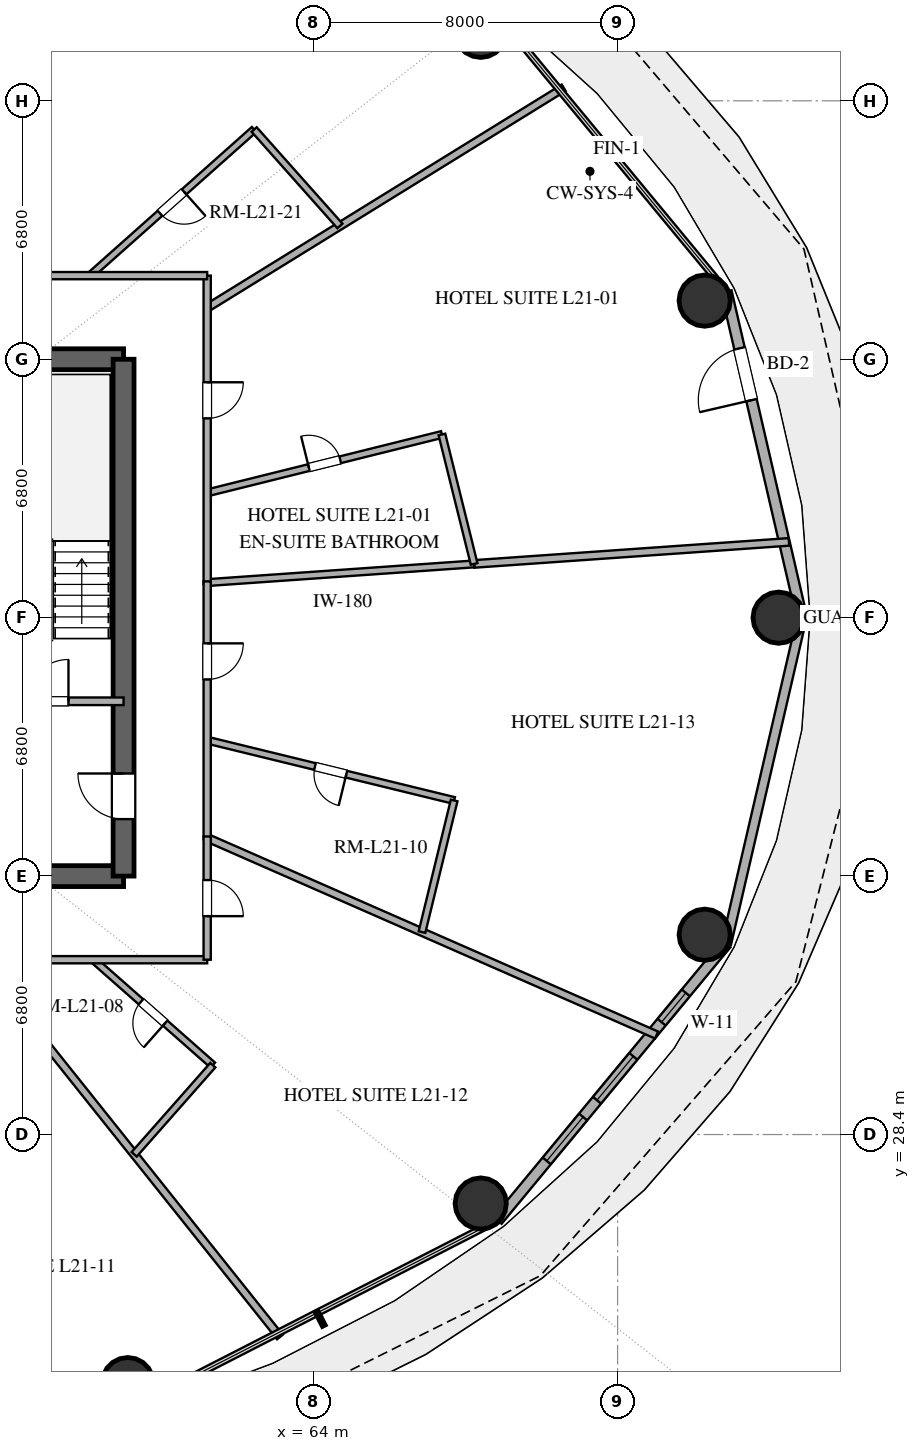
"""IFC4 building model, lengths in metres.
Left out: names, types, materials, properties, quantities, classifications, styles, units other than length and angle.
Written with IfcOpenShell. Run it as: python <this file> out.ifc"""

import sys

from ifc_helpers import new_model, si_unit, direction, frame, frame_2d, origin, origin_2d, place, context, subcontext, project, spatial, rectangle, hollow_circle, extrude, element, fill, save


model = new_model("IFC4")
c1 = context("Model", 3, precision=1e-05, world=origin(), true_north=direction((0.0, 1.0)))
c2 = subcontext(c1, "Body", "Model", "MODEL_VIEW")
j1 = project(units=[si_unit("LENGTHUNIT", "METRE"), si_unit("PLANEANGLEUNIT", "RADIAN")], contexts=[c1])
p1 = place(None, origin())
s1 = spatial("IfcSite", under=j1, at=p1, CompositionType="ELEMENT")
p2 = place(p1, origin())
s2 = spatial("IfcBuilding", under=s1, at=p2, CompositionType="ELEMENT")
p3 = place(p2, frame((0.0, 0.0, 87.6)))
s3 = spatial("IfcBuildingStorey", under=s2, at=p3, CompositionType="ELEMENT", Elevation=87.6)
for number, where, z_axis, x_axis in (
    (1, (55.0, 35.2, 0.0), (0.0, 0.0, 1.0), (1.0, 0.0, 0.0)),
    (2, (55.0, 48.8, 0.0), (0.0, 0.0, 1.0), (1.0, 0.0, 0.0)),
):
    element("IfcWall", number, at=place(p3, frame(where, z_axis=z_axis, x_axis=x_axis)), inside=s3, PredefinedType="SHEAR", context=c2, shape_type="SweptSolid", body=[
        extrude(rectangle(XDim=4.0, YDim=0.55, at=frame_2d((2.0, 0.0))), origin(), (0.0, 0.0, 1.0), 3.38),
    ])
p4 = place(p3, frame((59.0, 35.2, 0.0), z_axis=(0.0, 0.0, 1.0), x_axis=(0.0, 1.0, 0.0)))
e3 = element("IfcWall", 3, at=p4, inside=s3, PredefinedType="SHEAR", context=c2, shape_type="SweptSolid", body=[
    extrude(rectangle(XDim=13.6, YDim=0.55, at=frame_2d((6.8, 0.0))), origin(), (0.0, 0.0, 1.0), 3.38),
])
p5 = place(p4, frame((1.5, 0.0, 0.0)))
e4 = element("IfcOpeningElement", 4, at=p5, cuts=e3, PredefinedType="OPENING", context=c2, shape_type="SweptSolid", body=[
    extrude(rectangle(XDim=1.2, YDim=2.15, at=frame_2d((0.6, 1.075))), frame((0.0, 0.285, 0.0), z_axis=(0.0, -1.0, 0.0), x_axis=(1.0, 0.0, 0.0)), (0.0, 0.0, 1.0), 0.57),
])
for number, where, z_axis, x_axis in (
    (5, (76.237, 42.0, 0.0), (0.0, 0.0, 1.0), (1.0, 0.0, 0.0)),
    (6, (74.291, 50.343, 0.0), (0.0, 0.0, 1.0), (1.0, 0.0, 0.0)),
    (7, (68.398, 57.415, 0.0), (0.0, 0.0, 1.0), (1.0, 0.0, 0.0)),
    (8, (59.11, 21.859, 0.0), (0.0, 0.0, 1.0), (1.0, 0.0, 0.0)),
    (9, (68.398, 26.585, 0.0), (0.0, 0.0, 1.0), (1.0, 0.0, 0.0)),
    (10, (74.291, 33.657, 0.0), (0.0, 0.0, 1.0), (1.0, 0.0, 0.0)),
):
    element("IfcColumn", number, at=place(p3, frame(where, z_axis=z_axis, x_axis=x_axis)), inside=s3, PredefinedType="COLUMN", context=c2, shape_type="SweptSolid", body=[
        extrude(hollow_circle(Radius=0.675, WallThickness=0.036, at=origin_2d()), origin(), (0.0, 0.0, 1.0), 3.38),
    ])
p6 = place(p3, frame((76.849, 42.0, 0.0), z_axis=(0.0, 0.0, 1.0), x_axis=(-0.22558597182, 0.974223264616, 0.0)))
e11 = element("IfcWall", 11, at=p6, inside=s3, PredefinedType="SOLIDWALL", context=c2, shape_type="SweptSolid", body=[
    extrude(rectangle(XDim=8.811, YDim=0.28, at=frame_2d((4.405, 0.0))), origin(), (0.0, 0.0, 1.0), 3.38),
])
p7 = place(p6, frame((5.875, 0.0, 0.0)))
e12 = element("IfcOpeningElement", 12, at=p7, cuts=e11, PredefinedType="OPENING", context=c2, shape_type="SweptSolid", body=[
    extrude(rectangle(XDim=1.4, YDim=2.2, at=frame_2d((0.7, 1.1))), frame((0.0, 0.15, 0.0), z_axis=(0.0, -1.0, 0.0), x_axis=(1.0, 0.0, 0.0)), (0.0, 0.0, 1.0), 0.3),
])
p8 = place(p3, frame((68.84, 26.14, 0.0), z_axis=(0.0, 0.0, 1.0), x_axis=(0.637505817448, 0.770445541696, 0.0)))
e13 = element("IfcWall", 13, at=p8, inside=s3, PredefinedType="SOLIDWALL", context=c2, shape_type="SweptSolid", body=[
    extrude(rectangle(XDim=9.445, YDim=0.28, at=frame_2d((4.723, 0.0))), origin(), (0.0, 0.0, 1.0), 3.38),
])
p9 = place(p8, frame((2.033, 0.0, 0.85)))
e14 = element("IfcOpeningElement", 14, at=p9, cuts=e13, PredefinedType="OPENING", context=c2, shape_type="SweptSolid", body=[
    extrude(rectangle(XDim=1.5, YDim=1.8, at=frame_2d((0.75, 0.9))), frame((0.0, 0.15, 0.0), z_axis=(0.0, -1.0, 0.0), x_axis=(1.0, 0.0, 0.0)), (0.0, 0.0, 1.0), 0.3),
])
p10 = place(p8, frame((4.105, 0.0, 0.85)))
e15 = element("IfcOpeningElement", 15, at=p10, cuts=e13, PredefinedType="OPENING", context=c2, shape_type="SweptSolid", body=[
    extrude(rectangle(XDim=1.5, YDim=1.8, at=frame_2d((0.75, 0.9))), frame((0.0, 0.15, 0.0), z_axis=(0.0, -1.0, 0.0), x_axis=(1.0, 0.0, 0.0)), (0.0, 0.0, 1.0), 0.3),
])
p11 = place(p8, frame((6.772, 0.0, 0.85)))
e16 = element("IfcOpeningElement", 16, at=p11, cuts=e13, PredefinedType="OPENING", context=c2, shape_type="SweptSolid", body=[
    extrude(rectangle(XDim=1.0, YDim=1.8, at=frame_2d((0.5, 0.9))), frame((0.0, 0.15, 0.0), z_axis=(0.0, -1.0, 0.0), x_axis=(1.0, 0.0, 0.0)), (0.0, 0.0, 1.0), 0.3),
])
p12 = place(p3, frame((74.861, 33.417, 0.0), z_axis=(0.0, 0.0, 1.0), x_axis=(0.22558597182, 0.974223264616, 0.0)))
e17 = element("IfcWall", 17, at=p12, inside=s3, PredefinedType="SOLIDWALL", context=c2, shape_type="SweptSolid", body=[
    extrude(rectangle(XDim=8.811, YDim=0.25, at=frame_2d((4.405, 0.0))), origin(), (0.0, 0.0, 1.0), 3.38),
])
p13 = place(p3, frame((55.0, 39.8, 0.0), z_axis=(0.0, 0.0, 1.0), x_axis=(1.0, 0.0, 0.0)))
e18 = element("IfcWall", 18, at=p13, inside=s3, PredefinedType="SOLIDWALL", context=c2, shape_type="SweptSolid", body=[
    extrude(rectangle(XDim=4.0, YDim=0.2, at=frame_2d((2.0, 0.0))), origin(), (0.0, 0.0, 1.0), 2.74),
])
p14 = place(p13, frame((1.45, 0.0, 0.0)))
e19 = element("IfcOpeningElement", 19, at=p14, cuts=e18, PredefinedType="OPENING", context=c2, shape_type="SweptSolid", body=[
    extrude(rectangle(XDim=1.1, YDim=2.15, at=frame_2d((0.55, 1.075))), frame((0.0, 0.11, 0.0), z_axis=(0.0, -1.0, 0.0), x_axis=(1.0, 0.0, 0.0)), (0.0, 0.0, 1.0), 0.22),
])
p15 = place(p3, frame((76.509, 43.994, 0.0), z_axis=(0.0, 0.0, 1.0), x_axis=(-0.997563838401, -0.069759503404, 0.0)))
e20 = element("IfcWall", 20, at=p15, inside=s3, PredefinedType="PARTITIONING", context=c2, shape_type="SweptSolid", body=[
    extrude(rectangle(XDim=8.305, YDim=0.2, at=frame_2d((4.152, 0.0))), origin(), (0.0, 0.0, 1.0), 2.74),
])
p16 = place(p3, frame((60.112, 62.468, 0.0), z_axis=(0.0, 0.0, 1.0), x_axis=(-0.509263960295, -0.860610375689, 0.0)))
e21 = element("IfcWall", 21, at=p16, inside=s3, PredefinedType="PARTITIONING", context=c2, shape_type="SweptSolid", body=[
    extrude(rectangle(XDim=7.583, YDim=0.2, at=frame_2d((3.792, 0.0))), origin(), (0.0, 0.0, 1.0), 2.74),
])
p17 = place(p3, frame((68.224, 43.414, 0.0), z_axis=(0.0, 0.0, 1.0), x_axis=(-0.997563891584, -0.06975874287, 0.0)))
e22 = element("IfcWall", 22, at=p17, inside=s3, PredefinedType="PLUMBINGWALL", context=c2, shape_type="SweptSolid", body=[
    extrude(rectangle(XDim=7.042, YDim=0.18, at=frame_2d((3.521, 0.0))), origin(), (0.0, 0.0, 1.0), 2.74),
])
p18 = place(p3, frame((61.2, 50.15, 0.0), z_axis=(0.0, 0.0, 1.0), x_axis=(0.850874276333, 0.525369361377, 0.0)))
e23 = element("IfcWall", 23, at=p18, inside=s3, PredefinedType="PARTITIONING", context=c2, shape_type="SweptSolid", body=[
    extrude(rectangle(XDim=11.026, YDim=0.2, at=frame_2d((5.513, 0.0))), origin(), (0.0, 0.0, 1.0), 2.74),
])
p19 = place(p3, frame((61.2, 36.208, 0.0), z_axis=(0.0, 0.0, 1.0), x_axis=(0.915722078144, -0.401812239235, 0.0)))
e24 = element("IfcWall", 24, at=p19, inside=s3, PredefinedType="PARTITIONING", context=c2, shape_type="SweptSolid", body=[
    extrude(rectangle(XDim=12.915, YDim=0.2, at=frame_2d((6.458, 0.0))), origin(), (0.0, 0.0, 1.0), 2.74),
])
p20 = place(p3, frame((67.699, 37.189, 0.0), z_axis=(0.0, 0.0, 1.0), x_axis=(-0.971448370468, 0.237251055878, 0.0)))
e25 = element("IfcWall", 25, at=p20, inside=s3, PredefinedType="PLUMBINGWALL", context=c2, shape_type="SweptSolid", body=[
    extrude(rectangle(XDim=6.69, YDim=0.18, at=frame_2d((3.345, 0.0))), origin(), (0.0, 0.0, 1.0), 2.74),
])
p21 = place(p20, frame((2.92, 0.0, 0.0)))
e26 = element("IfcOpeningElement", 26, at=p21, cuts=e25, PredefinedType="OPENING", context=c2, shape_type="SweptSolid", body=[
    extrude(rectangle(XDim=0.85, YDim=2.1, at=frame_2d((0.425, 1.05))), frame((0.0, 0.1, 0.0), z_axis=(0.0, -1.0, 0.0), x_axis=(1.0, 0.0, 0.0)), (0.0, 0.0, 1.0), 0.2),
])
p22 = place(p3, frame((55.189, 33.0, 0.0), z_axis=(0.0, 0.0, 1.0), x_axis=(0.624085468444, -0.781356082767, 0.0)))
e27 = element("IfcWall", 27, at=p22, inside=s3, PredefinedType="PARTITIONING", context=c2, shape_type="SweptSolid", body=[
    extrude(rectangle(XDim=12.703, YDim=0.2, at=frame_2d((6.352, 0.0))), origin(), (0.0, 0.0, 1.0), 2.74),
])
p23 = place(p3, frame((61.2, 45.284, 0.0), z_axis=(0.0, 0.0, 1.0), x_axis=(0.970426102609, 0.241398383125, 0.0)))
e28 = element("IfcWall", 28, at=p23, inside=s3, PredefinedType="PLUMBINGWALL", context=c2, shape_type="SweptSolid", body=[
    extrude(rectangle(XDim=6.365, YDim=0.18, at=frame_2d((3.183, 0.0))), origin(), (0.0, 0.0, 1.0), 2.74),
])
p24 = place(p23, frame((2.758, 0.0, 0.0)))
e29 = element("IfcOpeningElement", 29, at=p24, cuts=e28, PredefinedType="OPENING", context=c2, shape_type="SweptSolid", body=[
    extrude(rectangle(XDim=0.85, YDim=2.1, at=frame_2d((0.425, 1.05))), frame((0.0, 0.1, 0.0), z_axis=(0.0, -1.0, 0.0), x_axis=(1.0, 0.0, 0.0)), (0.0, 0.0, 1.0), 0.2),
])
p25 = place(p3, frame((62.436, 54.844, 0.0), z_axis=(0.0, 0.0, 1.0), x_axis=(-0.747085499985, -0.664727956168, 0.0)))
e30 = element("IfcWall", 30, at=p25, inside=s3, PredefinedType="PLUMBINGWALL", context=c2, shape_type="SweptSolid", body=[
    extrude(rectangle(XDim=5.783, YDim=0.18, at=frame_2d((2.892, 0.0))), origin(), (0.0, 0.0, 1.0), 2.74),
])
p26 = place(p25, frame((2.467, 0.0, 0.0)))
e31 = element("IfcOpeningElement", 31, at=p26, cuts=e30, PredefinedType="OPENING", context=c2, shape_type="SweptSolid", body=[
    extrude(rectangle(XDim=0.85, YDim=2.1, at=frame_2d((0.425, 1.05))), frame((0.0, 0.1, 0.0), z_axis=(0.0, -1.0, 0.0), x_axis=(1.0, 0.0, 0.0)), (0.0, 0.0, 1.0), 0.2),
])
p27 = place(p3, frame((61.2, 51.0, 0.0), z_axis=(0.0, 0.0, 1.0), x_axis=(0.0, -1.0, 0.0)))
e32 = element("IfcWall", 32, at=p27, inside=s3, PredefinedType="PARTITIONING", context=c2, shape_type="SweptSolid", body=[
    extrude(rectangle(XDim=8.109, YDim=0.19, at=frame_2d((4.055, 0.0))), origin(), (0.0, 0.0, 1.0), 2.74),
])
p28 = place(p27, frame((2.806, 0.0, 0.0)))
e33 = element("IfcOpeningElement", 33, at=p28, cuts=e32, PredefinedType="OPENING", context=c2, shape_type="SweptSolid", body=[
    extrude(rectangle(XDim=0.95, YDim=2.15, at=frame_2d((0.475, 1.075))), frame((0.0, 0.105, 0.0), z_axis=(0.0, -1.0, 0.0), x_axis=(1.0, 0.0, 0.0)), (0.0, 0.0, 1.0), 0.21),
])
p29 = place(p3, frame((51.357, 51.0, 0.0), z_axis=(0.0, 0.0, 1.0), x_axis=(1.0, 0.0, 0.0)))
e34 = element("IfcWall", 34, at=p29, inside=s3, PredefinedType="PARTITIONING", context=c2, shape_type="SweptSolid", body=[
    extrude(rectangle(XDim=9.843, YDim=0.19, at=frame_2d((4.921, 0.0))), origin(), (0.0, 0.0, 1.0), 2.74),
])
p30 = place(p29, frame((3.894, 0.0, 0.0)))
e35 = element("IfcOpeningElement", 35, at=p30, cuts=e34, PredefinedType="OPENING", context=c2, shape_type="SweptSolid", body=[
    extrude(rectangle(XDim=0.95, YDim=2.15, at=frame_2d((0.475, 1.075))), frame((0.0, 0.105, 0.0), z_axis=(0.0, -1.0, 0.0), x_axis=(1.0, 0.0, 0.0)), (0.0, 0.0, 1.0), 0.21),
])
p31 = place(p3, frame((61.2, 42.955, 0.0), z_axis=(0.0, 0.0, 1.0), x_axis=(0.0, -1.0, 0.0)))
e36 = element("IfcWall", 36, at=p31, inside=s3, PredefinedType="PARTITIONING", context=c2, shape_type="SweptSolid", body=[
    extrude(rectangle(XDim=6.782, YDim=0.19, at=frame_2d((3.391, 0.0))), origin(), (0.0, 0.0, 1.0), 2.74),
])
p32 = place(p31, frame((1.631, 0.0, 0.0)))
e37 = element("IfcOpeningElement", 37, at=p32, cuts=e36, PredefinedType="OPENING", context=c2, shape_type="SweptSolid", body=[
    extrude(rectangle(XDim=0.95, YDim=2.15, at=frame_2d((0.475, 1.075))), frame((0.0, 0.105, 0.0), z_axis=(0.0, -1.0, 0.0), x_axis=(1.0, 0.0, 0.0)), (0.0, 0.0, 1.0), 0.21),
])
p33 = place(p3, frame((61.348, 30.225, 0.0), z_axis=(0.0, 0.0, 1.0), x_axis=(-0.749931272561, 0.661515749197, 0.0)))
e38 = element("IfcWall", 38, at=p33, inside=s3, PredefinedType="PLUMBINGWALL", context=c2, shape_type="SweptSolid", body=[
    extrude(rectangle(XDim=4.194, YDim=0.18, at=frame_2d((2.097, 0.0))), origin(), (0.0, 0.0, 1.0), 2.74),
])
p34 = place(p33, frame((1.672, 0.0, 0.0)))
e39 = element("IfcOpeningElement", 39, at=p34, cuts=e38, PredefinedType="OPENING", context=c2, shape_type="SweptSolid", body=[
    extrude(rectangle(XDim=0.85, YDim=2.1, at=frame_2d((0.425, 1.05))), frame((0.0, 0.1, 0.0), z_axis=(0.0, -1.0, 0.0), x_axis=(1.0, 0.0, 0.0)), (0.0, 0.0, 1.0), 0.2),
])
p35 = place(p3, frame((61.2, 33.0, 0.0), z_axis=(0.0, 0.0, 1.0), x_axis=(-1.0, 0.0, 0.0)))
e40 = element("IfcWall", 40, at=p35, inside=s3, PredefinedType="PARTITIONING", context=c2, shape_type="SweptSolid", body=[
    extrude(rectangle(XDim=11.496, YDim=0.19, at=frame_2d((5.748, 0.0))), origin(), (0.0, 0.0, 1.0), 2.74),
])
p36 = place(p35, frame((7.41, 0.0, 0.0)))
e41 = element("IfcOpeningElement", 41, at=p36, cuts=e40, PredefinedType="OPENING", context=c2, shape_type="SweptSolid", body=[
    extrude(rectangle(XDim=0.95, YDim=2.15, at=frame_2d((0.475, 1.075))), frame((0.0, 0.105, 0.0), z_axis=(0.0, -1.0, 0.0), x_axis=(1.0, 0.0, 0.0)), (0.0, 0.0, 1.0), 0.21),
])
p37 = place(p3, frame((66.853, 33.727, 0.0), z_axis=(0.0, 0.0, 1.0), x_axis=(0.237213207876, 0.971457613079, 0.0)))
e42 = element("IfcWall", 42, at=p37, inside=s3, PredefinedType="PLUMBINGWALL", context=c2, shape_type="SweptSolid", body=[
    extrude(rectangle(XDim=3.564, YDim=0.18, at=frame_2d((1.782, 0.0))), origin(), (0.0, 0.0, 1.0), 2.74),
])
p38 = place(p3, frame((67.377, 46.82, 0.0), z_axis=(0.0, 0.0, 1.0), x_axis=(0.241373388957, -0.970432319692, 0.0)))
e43 = element("IfcWall", 43, at=p38, inside=s3, PredefinedType="PLUMBINGWALL", context=c2, shape_type="SweptSolid", body=[
    extrude(rectangle(XDim=3.51, YDim=0.18, at=frame_2d((1.755, 0.0))), origin(), (0.0, 0.0, 1.0), 2.74),
])
p39 = place(p3, frame((64.694, 52.307, 0.0), z_axis=(0.0, 0.0, 1.0), x_axis=(-0.664720670732, 0.747091982222, 0.0)))
e44 = element("IfcWall", 44, at=p39, inside=s3, PredefinedType="PLUMBINGWALL", context=c2, shape_type="SweptSolid", body=[
    extrude(rectangle(XDim=3.397, YDim=0.18, at=frame_2d((1.698, 0.0))), origin(), (0.0, 0.0, 1.0), 2.74),
])
p40 = place(p3, frame((61.2, 36.243, 0.0), z_axis=(0.0, 0.0, 1.0), x_axis=(0.0, -1.0, 0.0)))
e45 = element("IfcWall", 45, at=p40, inside=s3, PredefinedType="PARTITIONING", context=c2, shape_type="SweptSolid", body=[
    extrude(rectangle(XDim=3.243, YDim=0.19, at=frame_2d((1.621, 0.0))), origin(), (0.0, 0.0, 1.0), 2.74),
])
p41 = place(p40, frame((1.146, 0.0, 0.0)))
e46 = element("IfcOpeningElement", 46, at=p41, cuts=e45, PredefinedType="OPENING", context=c2, shape_type="SweptSolid", body=[
    extrude(rectangle(XDim=0.95, YDim=2.15, at=frame_2d((0.475, 1.075))), frame((0.0, 0.105, 0.0), z_axis=(0.0, -1.0, 0.0), x_axis=(1.0, 0.0, 0.0)), (0.0, 0.0, 1.0), 0.21),
])
p42 = place(p3, frame((59.279, 27.879, 0.0), z_axis=(0.0, 0.0, 1.0), x_axis=(0.661515810511, 0.749931218475, 0.0)))
e47 = element("IfcWall", 47, at=p42, inside=s3, PredefinedType="PLUMBINGWALL", context=c2, shape_type="SweptSolid", body=[
    extrude(rectangle(XDim=3.129, YDim=0.18, at=frame_2d((1.564, 0.0))), origin(), (0.0, 0.0, 1.0), 2.74),
])
p43 = place(p7, origin())
e48 = element("IfcDoor", 48, at=p43, inside=s3, OperationType="SINGLE_SWING_LEFT", PredefinedType="DOOR", context=c2, shape_type="SweptSolid", body=[
    extrude(rectangle(XDim=1.4, YDim=2.2, at=frame_2d((0.7, 1.1))), frame((0.0, 0.025, 0.0), z_axis=(0.0, -1.0, 0.0), x_axis=(1.0, 0.0, 0.0)), (0.0, 0.0, 1.0), 0.05),
])
fill(e12, e48)
p44 = place(p9, origin())
e49 = element("IfcWindow", 49, at=p44, inside=s3, PartitioningType="SINGLE_PANEL", PredefinedType="WINDOW", context=c2, shape_type="SweptSolid", body=[
    extrude(rectangle(XDim=1.5, YDim=1.8, at=frame_2d((0.75, 0.9))), frame((0.0, 0.03, 0.0), z_axis=(0.0, -1.0, 0.0), x_axis=(1.0, 0.0, 0.0)), (0.0, 0.0, 1.0), 0.06),
])
fill(e14, e49)
p45 = place(p10, origin())
e50 = element("IfcWindow", 50, at=p45, inside=s3, PartitioningType="SINGLE_PANEL", PredefinedType="WINDOW", context=c2, shape_type="SweptSolid", body=[
    extrude(rectangle(XDim=1.5, YDim=1.8, at=frame_2d((0.75, 0.9))), frame((0.0, 0.03, 0.0), z_axis=(0.0, -1.0, 0.0), x_axis=(1.0, 0.0, 0.0)), (0.0, 0.0, 1.0), 0.06),
])
fill(e15, e50)
p46 = place(p11, origin())
e51 = element("IfcWindow", 51, at=p46, inside=s3, PartitioningType="SINGLE_PANEL", PredefinedType="WINDOW", context=c2, shape_type="SweptSolid", body=[
    extrude(rectangle(XDim=1.0, YDim=1.8, at=frame_2d((0.5, 0.9))), frame((0.0, 0.03, 0.0), z_axis=(0.0, -1.0, 0.0), x_axis=(1.0, 0.0, 0.0)), (0.0, 0.0, 1.0), 0.06),
])
fill(e16, e51)
p47 = place(p5, origin())
e52 = element("IfcDoor", 52, at=p47, inside=s3, OperationType="SINGLE_SWING_RIGHT", PredefinedType="DOOR", context=c2, shape_type="SweptSolid", body=[
    extrude(rectangle(XDim=1.2, YDim=2.15, at=frame_2d((0.6, 1.075))), frame((0.0, 0.025, 0.0), z_axis=(0.0, -1.0, 0.0), x_axis=(1.0, 0.0, 0.0)), (0.0, 0.0, 1.0), 0.05),
])
fill(e4, e52)
p48 = place(p14, origin())
e53 = element("IfcDoor", 53, at=p48, inside=s3, OperationType="SINGLE_SWING_RIGHT", PredefinedType="DOOR", context=c2, shape_type="SweptSolid", body=[
    extrude(rectangle(XDim=1.1, YDim=2.15, at=frame_2d((0.55, 1.075))), frame((0.0, 0.025, 0.0), z_axis=(0.0, -1.0, 0.0), x_axis=(1.0, 0.0, 0.0)), (0.0, 0.0, 1.0), 0.05),
])
fill(e19, e53)
p49 = place(p21, origin())
e54 = element("IfcDoor", 54, at=p49, inside=s3, OperationType="SINGLE_SWING_LEFT", PredefinedType="DOOR", context=c2, shape_type="SweptSolid", body=[
    extrude(rectangle(XDim=0.85, YDim=2.1, at=frame_2d((0.425, 1.05))), frame((0.0, 0.025, 0.0), z_axis=(0.0, -1.0, 0.0), x_axis=(1.0, 0.0, 0.0)), (0.0, 0.0, 1.0), 0.05),
])
fill(e26, e54)
p50 = place(p24, origin())
e55 = element("IfcDoor", 55, at=p50, inside=s3, OperationType="SINGLE_SWING_LEFT", PredefinedType="DOOR", context=c2, shape_type="SweptSolid", body=[
    extrude(rectangle(XDim=0.85, YDim=2.1, at=frame_2d((0.425, 1.05))), frame((0.0, 0.025, 0.0), z_axis=(0.0, -1.0, 0.0), x_axis=(1.0, 0.0, 0.0)), (0.0, 0.0, 1.0), 0.05),
])
fill(e29, e55)
p51 = place(p26, origin())
e56 = element("IfcDoor", 56, at=p51, inside=s3, OperationType="SINGLE_SWING_LEFT", PredefinedType="DOOR", context=c2, shape_type="SweptSolid", body=[
    extrude(rectangle(XDim=0.85, YDim=2.1, at=frame_2d((0.425, 1.05))), frame((0.0, 0.025, 0.0), z_axis=(0.0, -1.0, 0.0), x_axis=(1.0, 0.0, 0.0)), (0.0, 0.0, 1.0), 0.05),
])
fill(e31, e56)
p52 = place(p28, origin())
e57 = element("IfcDoor", 57, at=p52, inside=s3, OperationType="SINGLE_SWING_LEFT", PredefinedType="DOOR", context=c2, shape_type="SweptSolid", body=[
    extrude(rectangle(XDim=0.95, YDim=2.15, at=frame_2d((0.475, 1.075))), frame((0.0, 0.025, 0.0), z_axis=(0.0, -1.0, 0.0), x_axis=(1.0, 0.0, 0.0)), (0.0, 0.0, 1.0), 0.05),
])
fill(e33, e57)
p53 = place(p32, origin())
e58 = element("IfcDoor", 58, at=p53, inside=s3, OperationType="SINGLE_SWING_LEFT", PredefinedType="DOOR", context=c2, shape_type="SweptSolid", body=[
    extrude(rectangle(XDim=0.95, YDim=2.15, at=frame_2d((0.475, 1.075))), frame((0.0, 0.025, 0.0), z_axis=(0.0, -1.0, 0.0), x_axis=(1.0, 0.0, 0.0)), (0.0, 0.0, 1.0), 0.05),
])
fill(e37, e58)
p54 = place(p34, origin())
e59 = element("IfcDoor", 59, at=p54, inside=s3, OperationType="SINGLE_SWING_LEFT", PredefinedType="DOOR", context=c2, shape_type="SweptSolid", body=[
    extrude(rectangle(XDim=0.85, YDim=2.1, at=frame_2d((0.425, 1.05))), frame((0.0, 0.025, 0.0), z_axis=(0.0, -1.0, 0.0), x_axis=(1.0, 0.0, 0.0)), (0.0, 0.0, 1.0), 0.05),
])
fill(e39, e59)
p55 = place(p41, origin())
e60 = element("IfcDoor", 60, at=p55, inside=s3, OperationType="SINGLE_SWING_RIGHT", PredefinedType="DOOR", context=c2, shape_type="SweptSolid", body=[
    extrude(rectangle(XDim=0.95, YDim=2.15, at=frame_2d((0.475, 1.075))), frame((0.0, 0.025, 0.0), z_axis=(0.0, -1.0, 0.0), x_axis=(1.0, 0.0, 0.0)), (0.0, 0.0, 1.0), 0.05),
])
fill(e46, e60)
save(model, sys.argv[1])
